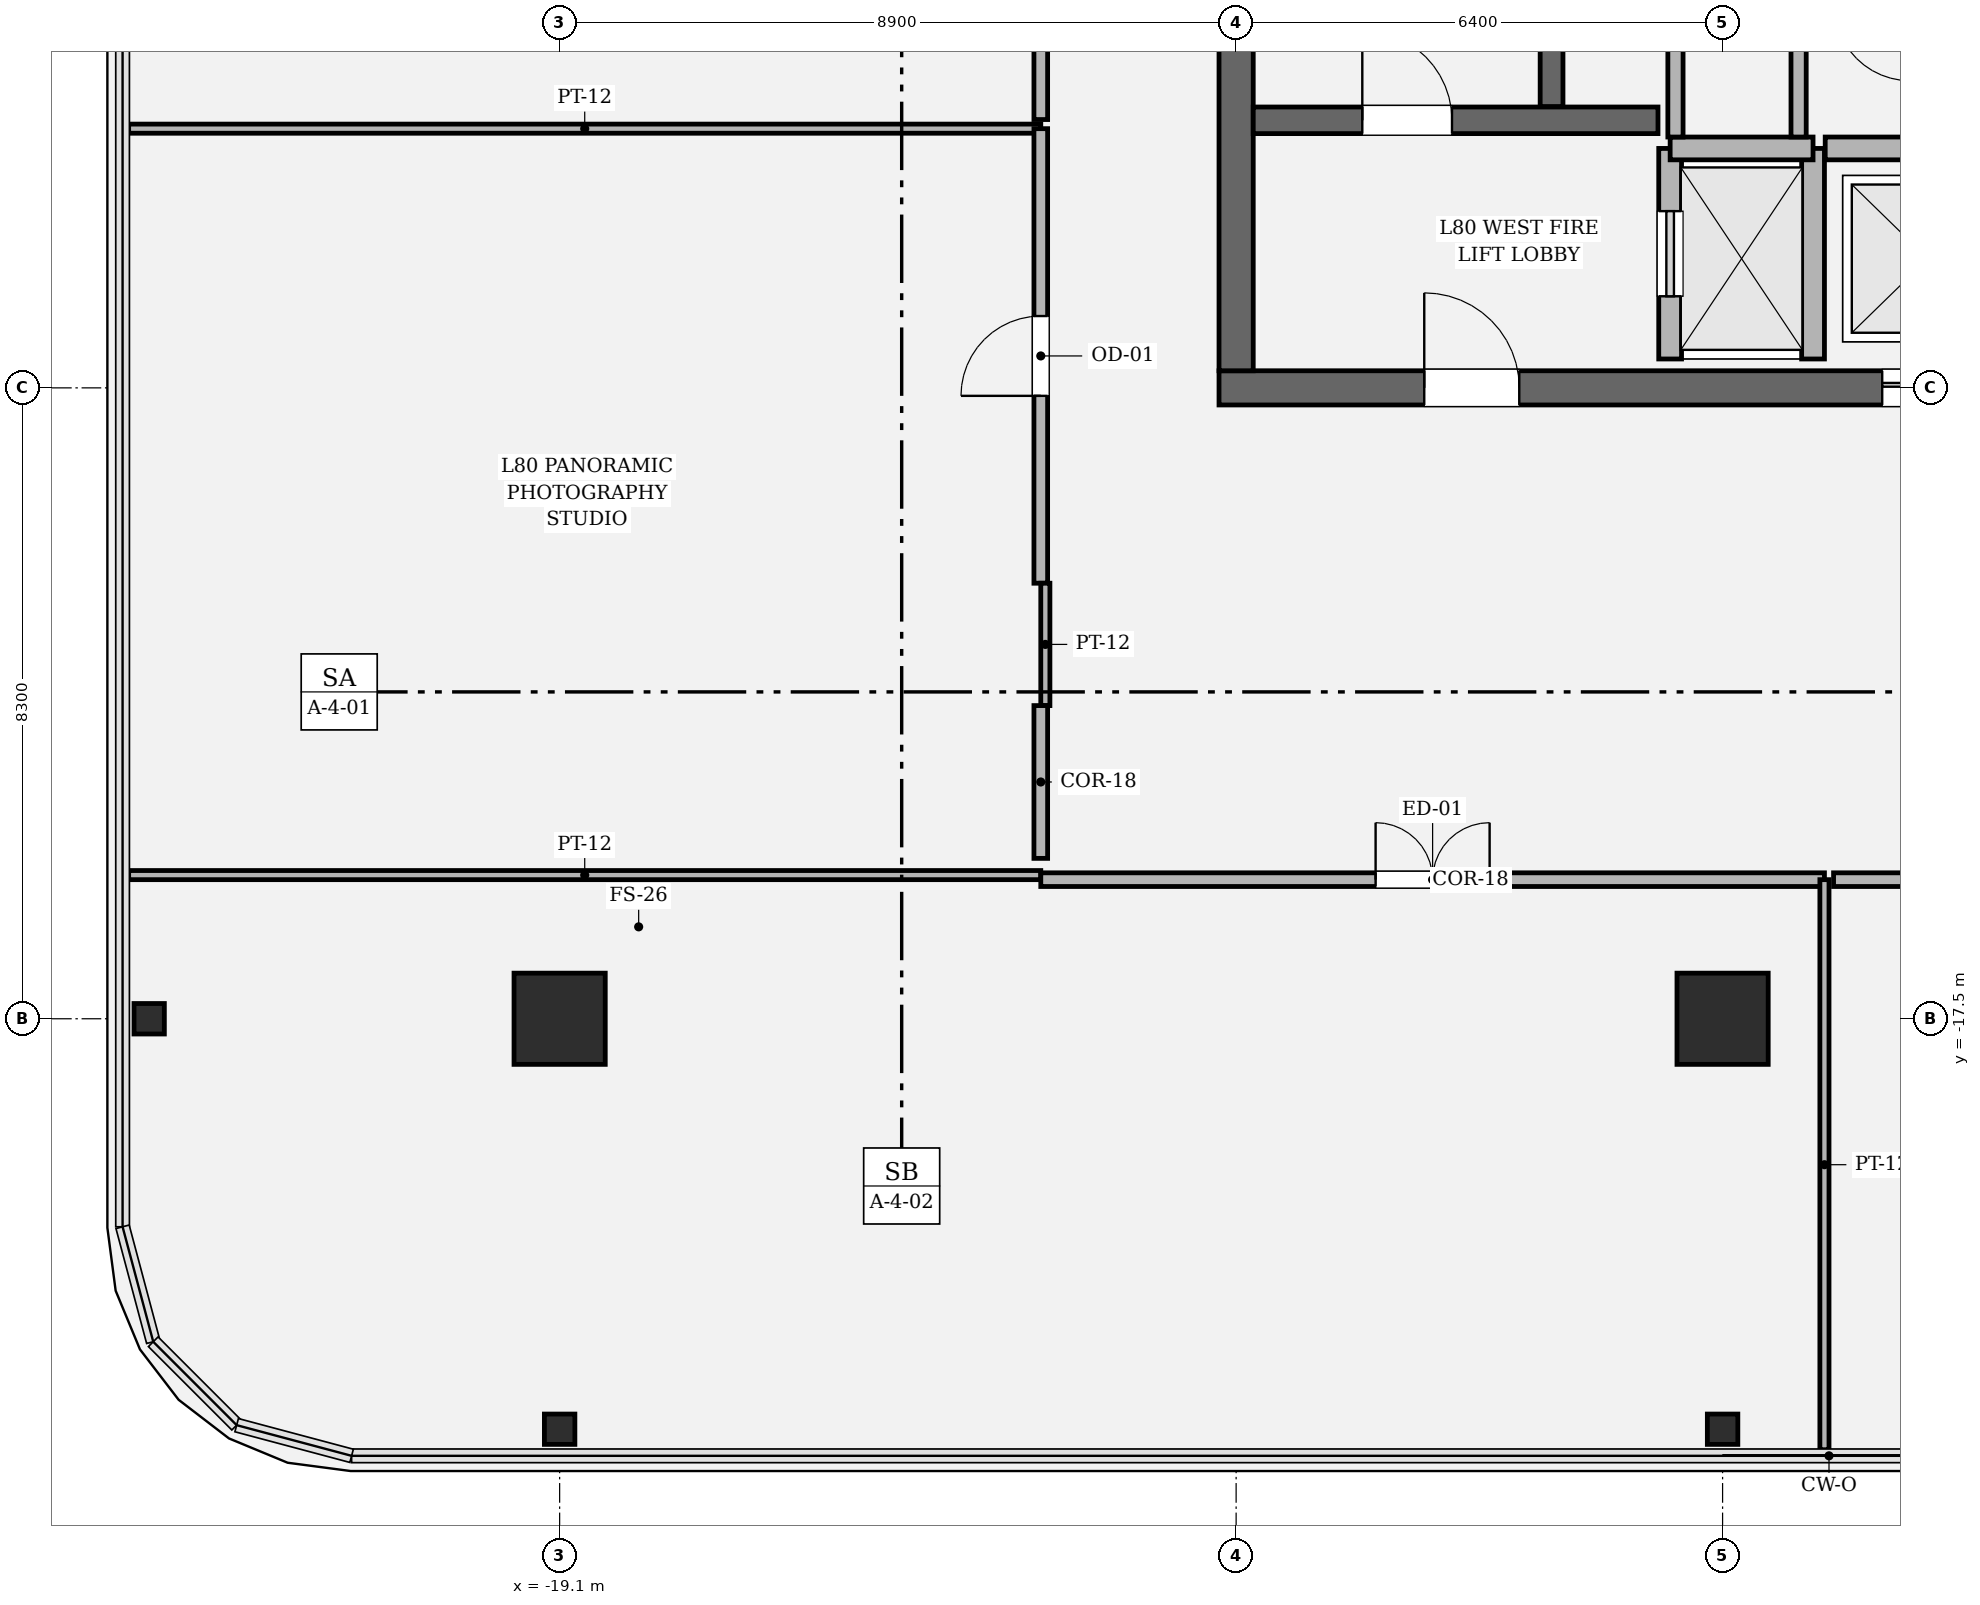
"""IFC4 building model, lengths in metres.
Left out: names, types, materials, properties, quantities, classifications, styles, units other than length and angle.
Written with IfcOpenShell. Run it as: python <this file> out.ifc"""

import sys

from ifc_helpers import new_model, si_unit, direction, frame, frame_2d, origin, origin_2d, place, context, subcontext, project, spatial, rectangle, hollow_rectangle, i_section, extrude, element, fill, save


model = new_model("IFC4")
c1 = context("Model", 3, precision=1e-05, world=origin(), true_north=direction((0.0, 1.0)))
c2 = subcontext(c1, "Body", "Model", "MODEL_VIEW")
j1 = project(units=[si_unit("LENGTHUNIT", "METRE"), si_unit("PLANEANGLEUNIT", "RADIAN")], contexts=[c1])
p1 = place(None, origin())
s1 = spatial("IfcSite", under=j1, at=p1, CompositionType="ELEMENT")
p2 = place(p1, origin())
s2 = spatial("IfcBuilding", under=s1, at=p2, CompositionType="ELEMENT")
p3 = place(p2, frame((0.0, 0.0, 339.0)))
s3 = spatial("IfcBuildingStorey", under=s2, at=p3, CompositionType="ELEMENT", Elevation=339.0)
p4 = place(p3, frame((10.425, -9.2, 0.0), z_axis=(0.0, 0.0, 1.0), x_axis=(-1.0, 0.0, 0.0)))
e1 = element("IfcWall", 1, at=p4, inside=s3, PredefinedType="SHEAR", context=c2, shape_type="SweptSolid", body=[
    extrude(rectangle(XDim=20.85, YDim=0.45, at=frame_2d((10.425, 0.0))), origin(), (0.0, 0.0, 1.0), 4.8),
])
p5 = place(p4, frame((2.7, 0.0, 0.0)))
e2 = element("IfcOpeningElement", 2, at=p5, cuts=e1, PredefinedType="OPENING", context=c2, shape_type="SweptSolid", body=[
    extrude(rectangle(XDim=1.25, YDim=2.25, at=frame_2d((0.625, 1.125))), frame((0.0, 0.235, 0.0), z_axis=(0.0, -1.0, 0.0), x_axis=(1.0, 0.0, 0.0)), (0.0, 0.0, 1.0), 0.47),
])
p6 = place(p4, frame((16.9, 0.0, 0.0)))
e3 = element("IfcOpeningElement", 3, at=p6, cuts=e1, PredefinedType="OPENING", context=c2, shape_type="SweptSolid", body=[
    extrude(rectangle(XDim=1.25, YDim=2.25, at=frame_2d((0.625, 1.125))), frame((0.0, 0.235, 0.0), z_axis=(0.0, -1.0, 0.0), x_axis=(1.0, 0.0, 0.0)), (0.0, 0.0, 1.0), 0.47),
])
p7 = place(p4, frame((10.925, 0.0, 0.0)))
e4 = element("IfcOpeningElement", 4, at=p7, cuts=e1, PredefinedType="OPENING", context=c2, shape_type="SweptSolid", body=[
    extrude(rectangle(XDim=1.2, YDim=2.3, at=frame_2d((0.6, 1.15))), frame((0.0, 0.235, 0.0), z_axis=(0.0, -1.0, 0.0), x_axis=(1.0, 0.0, 0.0)), (0.0, 0.0, 1.0), 0.47),
])
p8 = place(p4, frame((8.725, 0.0, 0.0)))
e5 = element("IfcOpeningElement", 5, at=p8, cuts=e1, PredefinedType="OPENING", context=c2, shape_type="SweptSolid", body=[
    extrude(rectangle(XDim=1.2, YDim=2.3, at=frame_2d((0.6, 1.15))), frame((0.0, 0.235, 0.0), z_axis=(0.0, -1.0, 0.0), x_axis=(1.0, 0.0, 0.0)), (0.0, 0.0, 1.0), 0.47),
])
p9 = place(p3, frame((-10.2, -8.975, 0.0), z_axis=(0.0, 0.0, 1.0), x_axis=(0.0, 1.0, 0.0)))
e6 = element("IfcWall", 6, at=p9, inside=s3, PredefinedType="SHEAR", context=c2, shape_type="SweptSolid", body=[
    extrude(rectangle(XDim=17.95, YDim=0.45, at=frame_2d((8.975, 0.0))), origin(), (0.0, 0.0, 1.0), 4.8),
])
p10 = place(p9, frame((12.765, 0.0, 0.0)))
e7 = element("IfcOpeningElement", 7, at=p10, cuts=e6, PredefinedType="OPENING", context=c2, shape_type="SweptSolid", body=[
    extrude(rectangle(XDim=1.18, YDim=2.2, at=frame_2d((0.59, 1.1))), frame((0.0, 0.235, 0.0), z_axis=(0.0, -1.0, 0.0), x_axis=(1.0, 0.0, 0.0)), (0.0, 0.0, 1.0), 0.47),
])
p11 = place(p3, frame((-6.05, -5.5, 0.0), z_axis=(0.0, 0.0, 1.0), x_axis=(0.0, 1.0, 0.0)))
e8 = element("IfcWall", 8, at=p11, inside=s3, PredefinedType="SOLIDWALL", context=c2, shape_type="SweptSolid", body=[
    extrude(rectangle(XDim=8.95, YDim=0.3, at=frame_2d((4.475, 0.0))), origin(), (0.0, 0.0, 1.0), 4.8),
])
p12 = place(p3, frame((-9.975, -5.68, 0.0), z_axis=(0.0, 0.0, 1.0), x_axis=(1.0, 0.0, 0.0)))
e9 = element("IfcWall", 9, at=p12, inside=s3, PredefinedType="SOLIDWALL", context=c2, shape_type="SweptSolid", body=[
    extrude(rectangle(XDim=5.325, YDim=0.35, at=frame_2d((2.663, 0.0))), origin(), (0.0, 0.0, 1.0), 4.8),
])
p13 = place(p12, frame((1.435, 0.0, 0.0)))
e10 = element("IfcOpeningElement", 10, at=p13, cuts=e9, PredefinedType="OPENING", context=c2, shape_type="SweptSolid", body=[
    extrude(rectangle(XDim=1.18, YDim=2.2, at=frame_2d((0.59, 1.1))), frame((0.0, 0.185, 0.0), z_axis=(0.0, -1.0, 0.0), x_axis=(1.0, 0.0, 0.0)), (0.0, 0.0, 1.0), 0.37),
])
for number, where, z_axis, x_axis in (
    (11, (-19.1, -17.5, 0.0), (0.0, 0.0, 1.0), (1.0, 0.0, 0.0)),
    (12, (-3.8, -17.5, 0.0), (0.0, 0.0, 1.0), (1.0, 0.0, 0.0)),
):
    element("IfcColumn", number, at=place(p3, frame(where, z_axis=z_axis, x_axis=x_axis)), inside=s3, PredefinedType="COLUMN", context=c2, shape_type="SweptSolid", body=[
        extrude(hollow_rectangle(XDim=1.2, YDim=1.2, WallThickness=0.035, at=origin_2d()), origin(), (0.0, 0.0, 1.0), 4.8),
    ])
for number, where, z_axis, x_axis in (
    (13, (-19.1, -22.9, 0.0), (0.0, 0.0, 1.0), (1.0, 0.0, 0.0)),
    (14, (-3.8, -22.9, 0.0), (0.0, 0.0, 1.0), (1.0, 0.0, 0.0)),
    (15, (-24.5, -17.5, 0.0), (0.0, 0.0, 1.0), (0.0, 1.0, 0.0)),
):
    element("IfcColumn", number, at=place(p3, frame(where, z_axis=z_axis, x_axis=x_axis)), inside=s3, PredefinedType="COLUMN", context=c2, shape_type="SweptSolid", body=[
        extrude(i_section(OverallWidth=0.401, OverallDepth=0.399, WebThickness=0.025, FlangeThickness=0.04, FilletRadius=0.018, at=origin_2d()), origin(), (0.0, 0.0, 1.0), 4.798),
    ])
p14 = place(p3, frame((-4.49, -8.82, 0.0), z_axis=(0.0, 0.0, 1.0), x_axis=(0.0, 1.0, 0.0)))
e16 = element("IfcWall", 16, at=p14, inside=s3, PredefinedType="SOLIDWALL", context=c2, shape_type="SweptSolid", body=[
    extrude(rectangle(XDim=2.77, YDim=0.3, at=frame_2d((1.385, 0.0))), origin(), (0.0, 0.0, 1.0), 4.52),
])
p15 = place(p14, frame((0.825, 0.0, 0.0)))
e17 = element("IfcOpeningElement", 17, at=p15, cuts=e16, PredefinedType="OPENING", context=c2, shape_type="SweptSolid", body=[
    extrude(rectangle(XDim=1.12, YDim=2.25, at=frame_2d((0.56, 1.125))), frame((0.0, 0.16, 0.0), z_axis=(0.0, -1.0, 0.0), x_axis=(1.0, 0.0, 0.0)), (0.0, 0.0, 1.0), 0.32),
])
p16 = place(p3, frame((-2.61, -8.82, 0.0), z_axis=(0.0, 0.0, 1.0), x_axis=(0.0, 1.0, 0.0)))
e18 = element("IfcWall", 18, at=p16, inside=s3, PredefinedType="SOLIDWALL", context=c2, shape_type="SweptSolid", body=[
    extrude(rectangle(XDim=2.77, YDim=0.3, at=frame_2d((1.385, 0.0))), origin(), (0.0, 0.0, 1.0), 4.52),
])
p17 = place(p3, frame((-4.49, -6.05, 0.0), z_axis=(0.0, 0.0, 1.0), x_axis=(1.0, 0.0, 0.0)))
e19 = element("IfcWall", 19, at=p17, inside=s3, PredefinedType="SOLIDWALL", context=c2, shape_type="SweptSolid", body=[
    extrude(rectangle(XDim=1.88, YDim=0.3, at=frame_2d((0.94, 0.0))), origin(), (0.0, 0.0, 1.0), 4.52),
])
p18 = place(p3, frame((-2.45, -6.05, 0.0), z_axis=(0.0, 0.0, 1.0), x_axis=(1.0, 0.0, 0.0)))
e20 = element("IfcWall", 20, at=p18, inside=s3, PredefinedType="SOLIDWALL", context=c2, shape_type="SweptSolid", body=[
    extrude(rectangle(XDim=4.9, YDim=0.3, at=frame_2d((2.45, 0.0))), origin(), (0.0, 0.0, 1.0), 4.52),
])
for number, where, z_axis, x_axis in (
    (21, (-2.8, -5.9, 0.0), (0.0, 0.0, 1.0), (0.0, 1.0, 0.0)),
    (22, (-4.42, -4.16, 0.0), (0.0, 0.0, 1.0), (0.0, -1.0, 0.0)),
):
    element("IfcWall", number, at=place(p3, frame(where, z_axis=z_axis, x_axis=x_axis)), inside=s3, PredefinedType="SOLIDWALL", context=c2, shape_type="SweptSolid", body=[
        extrude(rectangle(XDim=1.74, YDim=0.2, at=frame_2d((0.87, 0.0))), origin(), (0.0, 0.0, 1.0), 4.52),
    ])
p19 = place(p3, frame((-24.77, -15.61, 0.0), z_axis=(0.0, 0.0, 1.0), x_axis=(1.0, 0.0, 0.0)))
e23 = element("IfcWall", 23, at=p19, inside=s3, PredefinedType="PARTITIONING", context=c2, shape_type="SweptSolid", body=[
    extrude(rectangle(XDim=12.0, YDim=0.12, at=frame_2d((6.0, 0.0))), origin(), (0.0, 0.0, 1.0), 3.194),
])
p20 = place(p3, frame((-12.77, -15.67, 0.0), z_axis=(0.0, 0.0, 1.0), x_axis=(1.0, 0.0, 0.0)))
e24 = element("IfcWall", 24, at=p20, inside=s3, PredefinedType="PARTITIONING", context=c2, shape_type="SweptSolid", body=[
    extrude(rectangle(XDim=10.31, YDim=0.18, at=frame_2d((5.155, 0.0))), origin(), (0.0, 0.0, 1.0), 3.194),
])
p21 = place(p20, frame((4.405, 0.0, 0.0)))
e25 = element("IfcOpeningElement", 25, at=p21, cuts=e24, PredefinedType="OPENING", context=c2, shape_type="SweptSolid", body=[
    extrude(rectangle(XDim=1.5, YDim=2.3, at=frame_2d((0.75, 1.15))), frame((0.0, 0.1, 0.0), z_axis=(0.0, -1.0, 0.0), x_axis=(1.0, 0.0, 0.0)), (0.0, 0.0, 1.0), 0.2),
])
p22 = place(p3, frame((-2.46, -15.67, 0.0), z_axis=(0.0, 0.0, 1.0), x_axis=(0.0, -1.0, 0.0)))
e26 = element("IfcWall", 26, at=p22, inside=s3, PredefinedType="PARTITIONING", context=c2, shape_type="SweptSolid", body=[
    extrude(rectangle(XDim=7.5, YDim=0.12, at=frame_2d((3.75, 0.0))), origin(), (0.0, 0.0, 1.0), 3.194),
])
p23 = place(p3, frame((-2.34, -15.67, 0.0), z_axis=(0.0, 0.0, 1.0), x_axis=(1.0, 0.0, 0.0)))
e27 = element("IfcWall", 27, at=p23, inside=s3, PredefinedType="PARTITIONING", context=c2, shape_type="SweptSolid", body=[
    extrude(rectangle(XDim=9.74, YDim=0.18, at=frame_2d((4.87, 0.0))), origin(), (0.0, 0.0, 1.0), 3.194),
])
p24 = place(p3, frame((-24.77, -5.79, 0.0), z_axis=(0.0, 0.0, 1.0), x_axis=(1.0, 0.0, 0.0)))
e28 = element("IfcWall", 28, at=p24, inside=s3, PredefinedType="PARTITIONING", context=c2, shape_type="SweptSolid", body=[
    extrude(rectangle(XDim=12.0, YDim=0.12, at=frame_2d((6.0, 0.0))), origin(), (0.0, 0.0, 1.0), 3.194),
])
p25 = place(p3, frame((-12.77, -5.79, 0.0), z_axis=(0.0, 0.0, 1.0), x_axis=(0.0, -1.0, 0.0)))
e29 = element("IfcWall", 29, at=p25, inside=s3, PredefinedType="PARTITIONING", context=c2, shape_type="SweptSolid", body=[
    extrude(rectangle(XDim=5.98, YDim=0.18, at=frame_2d((2.99, 0.0))), origin(), (0.0, 0.0, 1.0), 3.194),
])
p26 = place(p25, frame((2.465, 0.0, 0.0)))
e30 = element("IfcOpeningElement", 30, at=p26, cuts=e29, PredefinedType="OPENING", context=c2, shape_type="SweptSolid", body=[
    extrude(rectangle(XDim=1.05, YDim=2.2, at=frame_2d((0.525, 1.1))), frame((0.0, 0.1, 0.0), z_axis=(0.0, -1.0, 0.0), x_axis=(1.0, 0.0, 0.0)), (0.0, 0.0, 1.0), 0.2),
])
p27 = place(p3, frame((-12.71, -11.77, 0.0), z_axis=(0.0, 0.0, 1.0), x_axis=(0.0, -1.0, 0.0)))
e31 = element("IfcWall", 31, at=p27, inside=s3, PredefinedType="PARTITIONING", context=c2, shape_type="SweptSolid", body=[
    extrude(rectangle(XDim=1.61, YDim=0.12, at=frame_2d((0.805, 0.0))), origin(), (0.0, 0.0, 1.0), 4.52),
])
p28 = place(p3, frame((-12.77, -13.38, 0.0), z_axis=(0.0, 0.0, 1.0), x_axis=(0.0, -1.0, 0.0)))
e32 = element("IfcWall", 32, at=p28, inside=s3, PredefinedType="PARTITIONING", context=c2, shape_type="SweptSolid", body=[
    extrude(rectangle(XDim=2.01, YDim=0.18, at=frame_2d((1.005, 0.0))), origin(), (0.0, 0.0, 1.0), 4.52),
])
p29 = place(p3, frame((-12.77, 6.6, 0.0), z_axis=(0.0, 0.0, 1.0), x_axis=(0.0, -1.0, 0.0)))
e33 = element("IfcWall", 33, at=p29, inside=s3, PredefinedType="PARTITIONING", context=c2, shape_type="SweptSolid", body=[
    extrude(rectangle(XDim=12.27, YDim=0.18, at=frame_2d((6.135, 0.0))), origin(), (0.0, 0.0, 1.0), 3.194),
])
p30 = place(p13, origin())
e34 = element("IfcDoor", 34, at=p30, inside=s3, OperationType="SINGLE_SWING_LEFT", PredefinedType="DOOR", context=c2, shape_type="SweptSolid", body=[
    extrude(rectangle(XDim=1.18, YDim=2.2, at=frame_2d((0.59, 1.1))), frame((0.0, 0.025, 0.0), z_axis=(0.0, -1.0, 0.0), x_axis=(1.0, 0.0, 0.0)), (0.0, 0.0, 1.0), 0.05),
])
fill(e10, e34)
p31 = place(p6, origin())
e35 = element("IfcDoor", 35, at=p31, inside=s3, OperationType="SINGLE_SWING_RIGHT", PredefinedType="DOOR", context=c2, shape_type="SweptSolid", body=[
    extrude(rectangle(XDim=1.25, YDim=2.25, at=frame_2d((0.625, 1.125))), frame((0.0, 0.025, 0.0), z_axis=(0.0, -1.0, 0.0), x_axis=(1.0, 0.0, 0.0)), (0.0, 0.0, 1.0), 0.05),
])
fill(e3, e35)
p32 = place(p15, origin())
e36 = element("IfcDoor", 36, at=p32, inside=s3, OperationType="SLIDING_TO_LEFT", PredefinedType="DOOR", context=c2, shape_type="SweptSolid", body=[
    extrude(rectangle(XDim=1.12, YDim=2.25, at=frame_2d((0.56, 1.125))), frame((0.0, 0.025, 0.0), z_axis=(0.0, -1.0, 0.0), x_axis=(1.0, 0.0, 0.0)), (0.0, 0.0, 1.0), 0.05),
])
fill(e17, e36)
p33 = place(p7, origin())
e37 = element("IfcDoor", 37, at=p33, inside=s3, OperationType="DOUBLE_DOOR_SLIDING", PredefinedType="DOOR", context=c2, shape_type="SweptSolid", body=[
    extrude(rectangle(XDim=1.2, YDim=2.3, at=frame_2d((0.6, 1.15))), frame((0.0, 0.025, 0.0), z_axis=(0.0, -1.0, 0.0), x_axis=(1.0, 0.0, 0.0)), (0.0, 0.0, 1.0), 0.05),
])
fill(e4, e37)
p34 = place(p21, origin())
e38 = element("IfcDoor", 38, at=p34, inside=s3, OperationType="DOUBLE_DOOR_SINGLE_SWING", PredefinedType="DOOR", context=c2, shape_type="SweptSolid", body=[
    extrude(rectangle(XDim=1.5, YDim=2.3, at=frame_2d((0.75, 1.15))), frame((0.0, 0.025, 0.0), z_axis=(0.0, -1.0, 0.0), x_axis=(1.0, 0.0, 0.0)), (0.0, 0.0, 1.0), 0.05),
])
fill(e25, e38)
p35 = place(p26, origin())
e39 = element("IfcDoor", 39, at=p35, inside=s3, OperationType="SINGLE_SWING_RIGHT", PredefinedType="DOOR", context=c2, shape_type="SweptSolid", body=[
    extrude(rectangle(XDim=1.05, YDim=2.2, at=frame_2d((0.525, 1.1))), frame((0.0, 0.025, 0.0), z_axis=(0.0, -1.0, 0.0), x_axis=(1.0, 0.0, 0.0)), (0.0, 0.0, 1.0), 0.05),
])
fill(e30, e39)
save(model, sys.argv[1])
